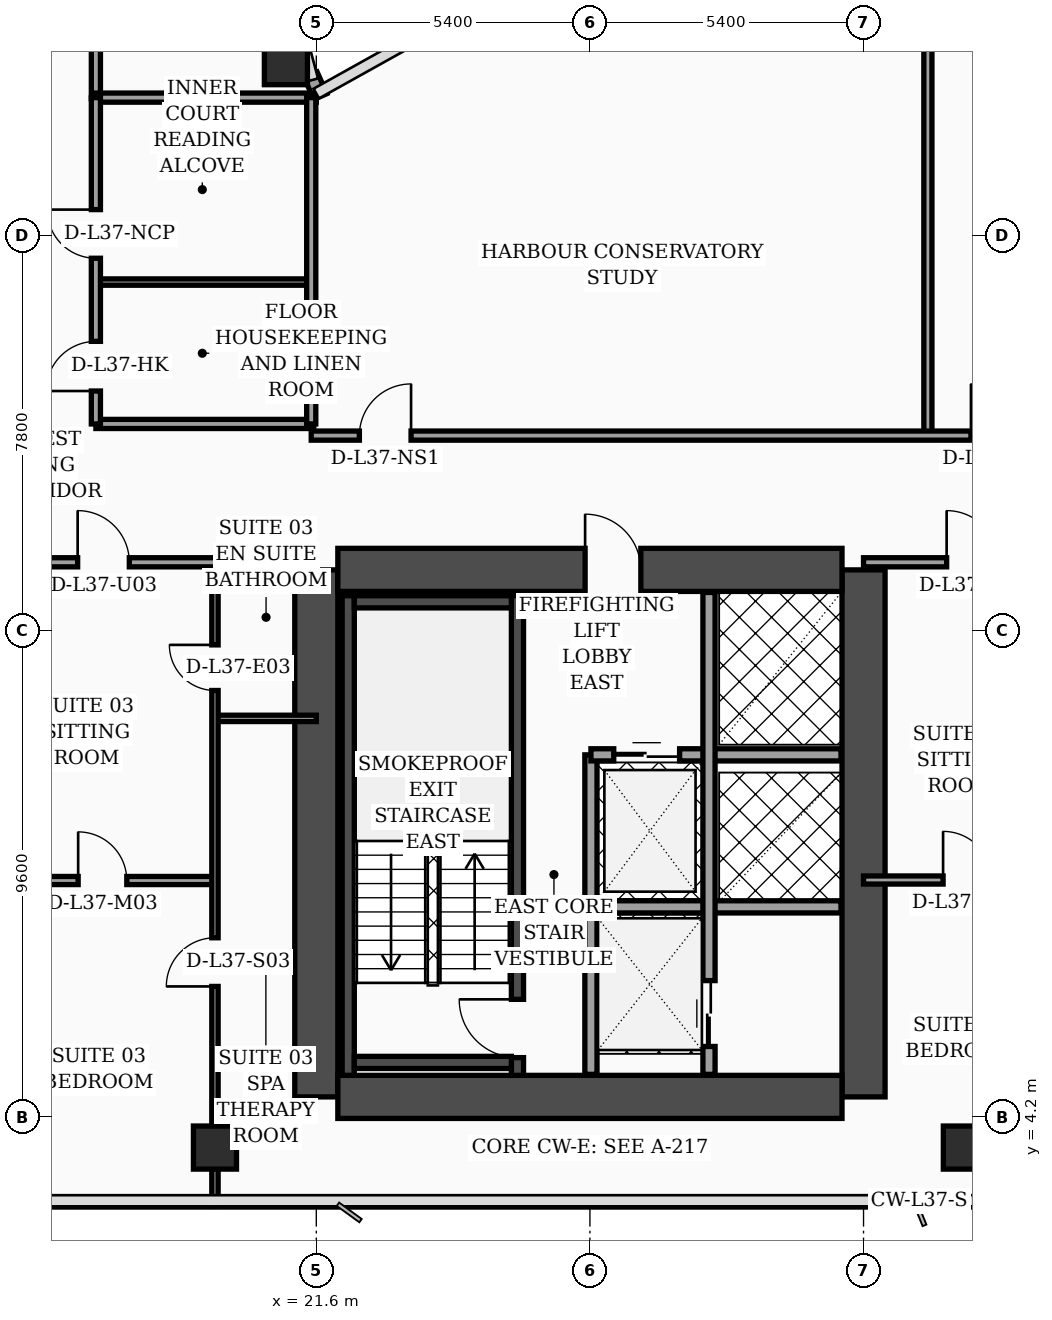
"""IFC4 building model, lengths in metres.
Left out: names, types, materials, properties, quantities, classifications, styles, units other than length and angle.
Written with IfcOpenShell. Run it as: python <this file> out.ifc"""

import sys

from ifc_helpers import new_model, si_unit, direction, frame, frame_2d, origin, origin_2d, place, context, subcontext, project, spatial, rectangle, hollow_rectangle, extrude, element, fill, save


model = new_model("IFC4")
c1 = context("Model", 3, precision=1e-05, world=origin(), true_north=direction((0.0, 1.0)))
c2 = subcontext(c1, "Body", "Model", "MODEL_VIEW")
j1 = project(units=[si_unit("LENGTHUNIT", "METRE"), si_unit("PLANEANGLEUNIT", "RADIAN")], contexts=[c1])
p1 = place(None, origin())
s1 = spatial("IfcSite", under=j1, at=p1, CompositionType="ELEMENT")
p2 = place(p1, origin())
s2 = spatial("IfcBuilding", under=s1, at=p2, CompositionType="ELEMENT")
p3 = place(p2, frame((0.0, 0.0, 152.3)))
s3 = spatial("IfcBuildingStorey", under=s2, at=p3, CompositionType="ELEMENT", Elevation=152.3)
for number, where, z_axis, x_axis in (
    (1, (21.6, 4.6, 0.0), (0.0, 0.0, 1.0), (0.0, 1.0, 0.0)),
    (2, (32.4, 4.6, 0.0), (0.0, 0.0, 1.0), (0.0, 1.0, 0.0)),
):
    element("IfcWall", number, at=place(p3, frame(where, z_axis=z_axis, x_axis=x_axis)), inside=s3, PredefinedType="SHEAR", context=c2, shape_type="SweptSolid", body=[
        extrude(rectangle(XDim=10.4, YDim=0.85, at=frame_2d((5.2, 0.0))), origin(), (0.0, 0.0, 1.0), 3.56),
    ])
p4 = place(p3, frame((22.025, 15.0, 0.0), z_axis=(0.0, 0.0, 1.0), x_axis=(1.0, 0.0, 0.0)))
e3 = element("IfcWall", 3, at=p4, inside=s3, PredefinedType="SHEAR", context=c2, shape_type="SweptSolid", body=[
    extrude(rectangle(XDim=9.95, YDim=0.85, at=frame_2d((4.975, 0.0))), origin(), (0.0, 0.0, 1.0), 3.56),
])
p5 = place(p4, frame((4.88, 0.0, 0.0)))
e4 = element("IfcOpeningElement", 4, at=p5, cuts=e3, PredefinedType="OPENING", context=c2, shape_type="SweptSolid", body=[
    extrude(rectangle(XDim=1.1, YDim=2.2, at=frame_2d((0.55, 1.1))), frame((0.0, 0.435, 0.0), z_axis=(0.0, -1.0, 0.0), x_axis=(1.0, 0.0, 0.0)), (0.0, 0.0, 1.0), 0.87),
])
p6 = place(p3, frame((22.025, 4.6, 0.0), z_axis=(0.0, 0.0, 1.0), x_axis=(1.0, 0.0, 0.0)))
e5 = element("IfcWall", 5, at=p6, inside=s3, PredefinedType="SHEAR", context=c2, shape_type="SweptSolid", body=[
    extrude(rectangle(XDim=9.95, YDim=0.85, at=frame_2d((4.975, 0.0))), origin(), (0.0, 0.0, 1.0), 3.56),
])
p7 = place(p3, frame((22.23, 5.025, 0.0), z_axis=(0.0, 0.0, 1.0), x_axis=(0.0, 1.0, 0.0)))
e6 = element("IfcWall", 6, at=p7, inside=s3, PredefinedType="SOLIDWALL", context=c2, shape_type="SweptSolid", body=[
    extrude(rectangle(XDim=9.465, YDim=0.24, at=frame_2d((4.732, 0.0))), origin(), (0.0, 0.0, 1.0), 3.56),
])
p8 = place(p3, frame((25.57, 5.025, 0.0), z_axis=(0.0, 0.0, 1.0), x_axis=(0.0, 1.0, 0.0)))
e7 = element("IfcWall", 7, at=p8, inside=s3, PredefinedType="SOLIDWALL", context=c2, shape_type="SweptSolid", body=[
    extrude(rectangle(XDim=9.465, YDim=0.24, at=frame_2d((4.732, 0.0))), origin(), (0.0, 0.0, 1.0), 3.56),
])
p9 = place(p8, frame((0.35, 0.0, 0.0)))
e8 = element("IfcOpeningElement", 8, at=p9, cuts=e7, PredefinedType="OPENING", context=c2, shape_type="SweptSolid", body=[
    extrude(rectangle(XDim=1.15, YDim=2.2, at=frame_2d((0.575, 1.1))), frame((0.0, 0.13, 0.0), z_axis=(0.0, -1.0, 0.0), x_axis=(1.0, 0.0, 0.0)), (0.0, 0.0, 1.0), 0.26),
])
for number, where, z_axis, x_axis in (
    (9, (22.35, 5.28, 0.0), (0.0, 0.0, 1.0), (1.0, 0.0, 0.0)),
    (10, (22.35, 14.37, 0.0), (0.0, 0.0, 1.0), (1.0, 0.0, 0.0)),
):
    element("IfcWall", number, at=place(p3, frame(where, z_axis=z_axis, x_axis=x_axis)), inside=s3, PredefinedType="SOLIDWALL", context=c2, shape_type="SweptSolid", body=[
        extrude(rectangle(XDim=3.1, YDim=0.24, at=frame_2d((1.55, 0.0))), origin(), (0.0, 0.0, 1.0), 3.56),
    ])
for number, where, z_axis, x_axis in (
    (11, (21.0, 25.0, 0.0), (0.0, 0.0, 1.0), (1.0, 0.0, 0.0)),
    (12, (19.6, 3.6, 0.0), (0.0, 0.0, 1.0), (1.0, 0.0, 0.0)),
    (13, (34.4, 3.6, 0.0), (0.0, 0.0, 1.0), (1.0, 0.0, 0.0)),
):
    element("IfcColumn", number, at=place(p3, frame(where, z_axis=z_axis, x_axis=x_axis)), inside=s3, PredefinedType="COLUMN", context=c2, shape_type="SweptSolid", body=[
        extrude(hollow_rectangle(XDim=0.85, YDim=0.85, WallThickness=0.036, at=origin_2d()), origin(), (0.0, 0.0, 1.0), 3.56),
    ])
p10 = place(p3, frame((21.68, 24.34, 0.0), z_axis=(0.0, 0.0, 1.0), x_axis=(-0.40758134973, 0.913168901875, 0.0)))
e14 = element("IfcWall", 14, at=p10, inside=s3, PredefinedType="SOLIDWALL", context=c2, shape_type="SweptSolid", body=[
    extrude(rectangle(XDim=0.471, YDim=0.28, at=frame_2d((0.235, 0.0))), origin(), (0.0, 0.0, 1.0), 3.56),
])
p11 = place(p3, frame((27.02, 5.045, 0.0), z_axis=(0.0, 0.0, 1.0), x_axis=(0.0, 1.0, 0.0)))
e15 = element("IfcWall", 15, at=p11, inside=s3, PredefinedType="SOLIDWALL", context=c2, shape_type="SweptSolid", body=[
    extrude(rectangle(XDim=6.305, YDim=0.24, at=frame_2d((3.153, 0.0))), origin(), (0.0, 0.0, 1.0), 3.56),
])
p12 = place(p3, frame((27.02, 11.35, 0.0), z_axis=(0.0, 0.0, 1.0), x_axis=(1.0, 0.0, 0.0)))
e16 = element("IfcWall", 16, at=p12, inside=s3, PredefinedType="SOLIDWALL", context=c2, shape_type="SweptSolid", body=[
    extrude(rectangle(XDim=4.935, YDim=0.24, at=frame_2d((2.468, 0.0))), origin(), (0.0, 0.0, 1.0), 3.56),
])
p13 = place(p12, frame((0.45, 0.0, 0.0)))
e17 = element("IfcOpeningElement", 17, at=p13, cuts=e16, PredefinedType="OPENING", context=c2, shape_type="SweptSolid", body=[
    extrude(rectangle(XDim=1.3, YDim=2.35, at=frame_2d((0.65, 1.175))), frame((0.0, 0.13, 0.0), z_axis=(0.0, -1.0, 0.0), x_axis=(1.0, 0.0, 0.0)), (0.0, 0.0, 1.0), 0.26),
])
p14 = place(p3, frame((27.02, 8.35, 0.0), z_axis=(0.0, 0.0, 1.0), x_axis=(1.0, 0.0, 0.0)))
e18 = element("IfcWall", 18, at=p14, inside=s3, PredefinedType="SOLIDWALL", context=c2, shape_type="SweptSolid", body=[
    extrude(rectangle(XDim=4.935, YDim=0.24, at=frame_2d((2.468, 0.0))), origin(), (0.0, 0.0, 1.0), 3.56),
])
p15 = place(p3, frame((29.35, 5.045, 0.0), z_axis=(0.0, 0.0, 1.0), x_axis=(0.0, 1.0, 0.0)))
e19 = element("IfcWall", 19, at=p15, inside=s3, PredefinedType="SOLIDWALL", context=c2, shape_type="SweptSolid", body=[
    extrude(rectangle(XDim=9.51, YDim=0.24, at=frame_2d((4.755, 0.0))), origin(), (0.0, 0.0, 1.0), 3.56),
])
p16 = place(p15, frame((0.55, 0.0, 0.0)))
e20 = element("IfcOpeningElement", 20, at=p16, cuts=e19, PredefinedType="OPENING", context=c2, shape_type="SweptSolid", body=[
    extrude(rectangle(XDim=1.3, YDim=2.35, at=frame_2d((0.65, 1.175))), frame((0.0, 0.13, 0.0), z_axis=(0.0, -1.0, 0.0), x_axis=(1.0, 0.0, 0.0)), (0.0, 0.0, 1.0), 0.26),
])
p17 = place(p3, frame((19.6, 12.07, 0.0), z_axis=(0.0, 0.0, 1.0), x_axis=(1.0, 0.0, 0.0)))
e21 = element("IfcWall", 21, at=p17, inside=s3, PredefinedType="PARTITIONING", context=c2, shape_type="SweptSolid", body=[
    extrude(rectangle(XDim=2.0, YDim=0.125, at=frame_2d((1.0, 0.0))), origin(), (0.0, 0.0, 1.0), 3.56),
])
p18 = place(p3, frame((15.15, 8.87, 0.0), z_axis=(0.0, 0.0, 1.0), x_axis=(1.0, 0.0, 0.0)))
e22 = element("IfcWall", 22, at=p18, inside=s3, PredefinedType="PARTITIONING", context=c2, shape_type="SweptSolid", body=[
    extrude(rectangle(XDim=4.45, YDim=0.16, at=frame_2d((2.225, 0.0))), origin(), (0.0, 0.0, 1.0), 3.56),
])
p19 = place(p18, frame((1.75, 0.0, 0.0)))
e23 = element("IfcOpeningElement", 23, at=p19, cuts=e22, PredefinedType="OPENING", context=c2, shape_type="SweptSolid", body=[
    extrude(rectangle(XDim=0.96, YDim=2.2, at=frame_2d((0.48, 1.1))), frame((0.0, 0.09, 0.0), z_axis=(0.0, -1.0, 0.0), x_axis=(1.0, 0.0, 0.0)), (0.0, 0.0, 1.0), 0.18),
])
p20 = place(p3, frame((19.6, 2.44, 0.0), z_axis=(0.0, 0.0, 1.0), x_axis=(0.0, 1.0, 0.0)))
e24 = element("IfcWall", 24, at=p20, inside=s3, PredefinedType="PARTITIONING", context=c2, shape_type="SweptSolid", body=[
    extrude(rectangle(XDim=12.71, YDim=0.125, at=frame_2d((6.355, 0.0))), origin(), (0.0, 0.0, 1.0), 2.49),
])
p21 = place(p20, frame((4.34, 0.0, 0.0)))
e25 = element("IfcOpeningElement", 25, at=p21, cuts=e24, PredefinedType="OPENING", context=c2, shape_type="SweptSolid", body=[
    extrude(rectangle(XDim=0.96, YDim=2.2, at=frame_2d((0.48, 1.1))), frame((0.0, 0.073, 0.0), z_axis=(0.0, -1.0, 0.0), x_axis=(1.0, 0.0, 0.0)), (0.0, 0.0, 1.0), 0.145),
])
p22 = place(p20, frame((10.18, 0.0, 0.0)))
e26 = element("IfcOpeningElement", 26, at=p22, cuts=e24, PredefinedType="OPENING", context=c2, shape_type="SweptSolid", body=[
    extrude(rectangle(XDim=0.9, YDim=2.15, at=frame_2d((0.45, 1.075))), frame((0.0, 0.073, 0.0), z_axis=(0.0, -1.0, 0.0), x_axis=(1.0, 0.0, 0.0)), (0.0, 0.0, 1.0), 0.145),
])
p23 = place(p3, frame((15.15, 15.15, 0.0), z_axis=(0.0, 0.0, 1.0), x_axis=(1.0, 0.0, 0.0)))
e27 = element("IfcWall", 27, at=p23, inside=s3, PredefinedType="PARTITIONING", context=c2, shape_type="SweptSolid", body=[
    extrude(rectangle(XDim=6.45, YDim=0.18, at=frame_2d((3.225, 0.0))), origin(), (0.0, 0.0, 1.0), 2.49),
])
p24 = place(p23, frame((1.74, 0.0, 0.0)))
e28 = element("IfcOpeningElement", 28, at=p24, cuts=e27, PredefinedType="OPENING", context=c2, shape_type="SweptSolid", body=[
    extrude(rectangle(XDim=1.02, YDim=2.2, at=frame_2d((0.51, 1.1))), frame((0.0, 0.1, 0.0), z_axis=(0.0, -1.0, 0.0), x_axis=(1.0, 0.0, 0.0)), (0.0, 0.0, 1.0), 0.2),
])
p25 = place(p3, frame((17.25, 24.3, 0.0), z_axis=(0.0, 0.0, 1.0), x_axis=(0.0, 1.0, 0.0)))
e29 = element("IfcWall", 29, at=p25, inside=s3, PredefinedType="PARTITIONING", context=c2, shape_type="SweptSolid", body=[
    extrude(rectangle(XDim=17.65, YDim=0.18, at=frame_2d((8.825, 0.0))), origin(), (0.0, 0.0, 1.0), 2.94),
])
p26 = place(p3, frame((17.25, 17.88, 0.0), z_axis=(0.0, 0.0, 1.0), x_axis=(1.0, 0.0, 0.0)))
e30 = element("IfcWall", 30, at=p26, inside=s3, PredefinedType="PARTITIONING", context=c2, shape_type="SweptSolid", body=[
    extrude(rectangle(XDim=4.3, YDim=0.18, at=frame_2d((2.15, 0.0))), origin(), (0.0, 0.0, 1.0), 3.09),
])
p27 = place(p3, frame((17.25, 20.68, 0.0), z_axis=(0.0, 0.0, 1.0), x_axis=(1.0, 0.0, 0.0)))
e31 = element("IfcWall", 31, at=p27, inside=s3, PredefinedType="PARTITIONING", context=c2, shape_type="SweptSolid", body=[
    extrude(rectangle(XDim=4.3, YDim=0.125, at=frame_2d((2.15, 0.0))), origin(), (0.0, 0.0, 1.0), 3.56),
])
p28 = place(p3, frame((17.25, 24.32, 0.0), z_axis=(0.0, 0.0, 1.0), x_axis=(1.0, 0.0, 0.0)))
e32 = element("IfcWall", 32, at=p28, inside=s3, PredefinedType="PARTITIONING", context=c2, shape_type="SweptSolid", body=[
    extrude(rectangle(XDim=4.35, YDim=0.18, at=frame_2d((2.175, 0.0))), origin(), (0.0, 0.0, 1.0), 3.56),
])
p29 = place(p3, frame((21.5, 17.88, 0.0), z_axis=(0.0, 0.0, 1.0), x_axis=(0.0, 1.0, 0.0)))
e33 = element("IfcWall", 33, at=p29, inside=s3, PredefinedType="PARTITIONING", context=c2, shape_type="SweptSolid", body=[
    extrude(rectangle(XDim=6.44, YDim=0.18, at=frame_2d((3.22, 0.0))), origin(), (0.0, 0.0, 1.0), 3.09),
])
p30 = place(p3, frame((17.25, 17.88, 0.0), z_axis=(0.0, 0.0, 1.0), x_axis=(0.0, 1.0, 0.0)))
e34 = element("IfcWall", 34, at=p30, inside=s3, PredefinedType="PARTITIONING", context=c2, shape_type="SweptSolid", body=[
    extrude(rectangle(XDim=6.44, YDim=0.18, at=frame_2d((3.22, 0.0))), origin(), (0.0, 0.0, 1.0), 3.09),
])
p31 = place(p30, frame((0.65, 0.0, 0.0)))
e35 = element("IfcOpeningElement", 35, at=p31, cuts=e34, PredefinedType="OPENING", context=c2, shape_type="SweptSolid", body=[
    extrude(rectangle(XDim=0.98, YDim=2.15, at=frame_2d((0.49, 1.075))), frame((0.0, 0.1, 0.0), z_axis=(0.0, -1.0, 0.0), x_axis=(1.0, 0.0, 0.0)), (0.0, 0.0, 1.0), 0.2),
])
p32 = place(p30, frame((3.27, 0.0, 0.0)))
e36 = element("IfcOpeningElement", 36, at=p32, cuts=e34, PredefinedType="OPENING", context=c2, shape_type="SweptSolid", body=[
    extrude(rectangle(XDim=0.96, YDim=2.2, at=frame_2d((0.48, 1.1))), frame((0.0, 0.1, 0.0), z_axis=(0.0, -1.0, 0.0), x_axis=(1.0, 0.0, 0.0)), (0.0, 0.0, 1.0), 0.2),
])
p33 = place(p3, frame((32.4, 8.88, 0.0), z_axis=(0.0, 0.0, 1.0), x_axis=(1.0, 0.0, 0.0)))
e37 = element("IfcWall", 37, at=p33, inside=s3, PredefinedType="PARTITIONING", context=c2, shape_type="SweptSolid", body=[
    extrude(rectangle(XDim=4.09, YDim=0.16, at=frame_2d((2.045, 0.0))), origin(), (0.0, 0.0, 1.0), 2.94),
])
p34 = place(p33, frame((1.57, 0.0, 0.0)))
e38 = element("IfcOpeningElement", 38, at=p34, cuts=e37, PredefinedType="OPENING", context=c2, shape_type="SweptSolid", body=[
    extrude(rectangle(XDim=0.96, YDim=2.2, at=frame_2d((0.48, 1.1))), frame((0.0, 0.09, 0.0), z_axis=(0.0, -1.0, 0.0), x_axis=(1.0, 0.0, 0.0)), (0.0, 0.0, 1.0), 0.18),
])
p35 = place(p3, frame((32.4, 15.15, 0.0), z_axis=(0.0, 0.0, 1.0), x_axis=(1.0, 0.0, 0.0)))
e39 = element("IfcWall", 39, at=p35, inside=s3, PredefinedType="PARTITIONING", context=c2, shape_type="SweptSolid", body=[
    extrude(rectangle(XDim=20.2, YDim=0.18, at=frame_2d((10.1, 0.0))), origin(), (0.0, 0.0, 1.0), 2.94),
])
p36 = place(p35, frame((1.64, 0.0, 0.0)))
e40 = element("IfcOpeningElement", 40, at=p36, cuts=e39, PredefinedType="OPENING", context=c2, shape_type="SweptSolid", body=[
    extrude(rectangle(XDim=1.02, YDim=2.2, at=frame_2d((0.51, 1.1))), frame((0.0, 0.1, 0.0), z_axis=(0.0, -1.0, 0.0), x_axis=(1.0, 0.0, 0.0)), (0.0, 0.0, 1.0), 0.2),
])
p37 = place(p35, frame((8.2, 0.0, 0.0)))
e41 = element("IfcOpeningElement", 41, at=p37, cuts=e39, PredefinedType="OPENING", context=c2, shape_type="SweptSolid", body=[
    extrude(rectangle(XDim=1.02, YDim=2.2, at=frame_2d((0.51, 1.1))), frame((0.0, 0.1, 0.0), z_axis=(0.0, -1.0, 0.0), x_axis=(1.0, 0.0, 0.0)), (0.0, 0.0, 1.0), 0.2),
])
p38 = place(p35, frame((15.39, 0.0, 0.0)))
e42 = element("IfcOpeningElement", 42, at=p38, cuts=e39, PredefinedType="OPENING", context=c2, shape_type="SweptSolid", body=[
    extrude(rectangle(XDim=1.02, YDim=2.2, at=frame_2d((0.51, 1.1))), frame((0.0, 0.1, 0.0), z_axis=(0.0, -1.0, 0.0), x_axis=(1.0, 0.0, 0.0)), (0.0, 0.0, 1.0), 0.2),
])
p39 = place(p3, frame((33.67, 17.65, 0.0), z_axis=(0.0, 0.0, 1.0), x_axis=(0.0, 1.0, 0.0)))
e43 = element("IfcWall", 43, at=p39, inside=s3, PredefinedType="PARTITIONING", context=c2, shape_type="SweptSolid", body=[
    extrude(rectangle(XDim=13.56, YDim=0.16, at=frame_2d((6.78, 0.0))), origin(), (0.0, 0.0, 1.0), 2.94),
])
p40 = place(p3, frame((21.5, 17.65, 0.0), z_axis=(0.0, 0.0, 1.0), x_axis=(1.0, 0.0, 0.0)))
e44 = element("IfcWall", 44, at=p40, inside=s3, PredefinedType="PARTITIONING", context=c2, shape_type="SweptSolid", body=[
    extrude(rectangle(XDim=24.25, YDim=0.18, at=frame_2d((12.125, 0.0))), origin(), (0.0, 0.0, 1.0), 2.94),
])
p41 = place(p40, frame((0.95, 0.0, 0.0)))
e45 = element("IfcOpeningElement", 45, at=p41, cuts=e44, PredefinedType="OPENING", context=c2, shape_type="SweptSolid", body=[
    extrude(rectangle(XDim=1.02, YDim=2.2, at=frame_2d((0.51, 1.1))), frame((0.0, 0.1, 0.0), z_axis=(0.0, -1.0, 0.0), x_axis=(1.0, 0.0, 0.0)), (0.0, 0.0, 1.0), 0.2),
])
p42 = place(p40, frame((13.02, 0.0, 0.0)))
e46 = element("IfcOpeningElement", 46, at=p42, cuts=e44, PredefinedType="OPENING", context=c2, shape_type="SweptSolid", body=[
    extrude(rectangle(XDim=1.02, YDim=2.2, at=frame_2d((0.51, 1.1))), frame((0.0, 0.1, 0.0), z_axis=(0.0, -1.0, 0.0), x_axis=(1.0, 0.0, 0.0)), (0.0, 0.0, 1.0), 0.2),
])
p43 = place(p13, origin())
e47 = element("IfcDoor", 47, at=p43, inside=s3, OperationType="DOUBLE_DOOR_SLIDING", PredefinedType="DOOR", context=c2, shape_type="SweptSolid", body=[
    extrude(rectangle(XDim=1.3, YDim=2.35, at=frame_2d((0.65, 1.175))), frame((0.0, 0.025, 0.0), z_axis=(0.0, -1.0, 0.0), x_axis=(1.0, 0.0, 0.0)), (0.0, 0.0, 1.0), 0.05),
])
fill(e17, e47)
p44 = place(p16, origin())
e48 = element("IfcDoor", 48, at=p44, inside=s3, OperationType="DOUBLE_DOOR_SLIDING", PredefinedType="DOOR", context=c2, shape_type="SweptSolid", body=[
    extrude(rectangle(XDim=1.3, YDim=2.35, at=frame_2d((0.65, 1.175))), frame((0.0, 0.025, 0.0), z_axis=(0.0, -1.0, 0.0), x_axis=(1.0, 0.0, 0.0)), (0.0, 0.0, 1.0), 0.05),
])
fill(e20, e48)
p45 = place(p19, origin())
e49 = element("IfcDoor", 49, at=p45, inside=s3, OperationType="SINGLE_SWING_LEFT", PredefinedType="DOOR", context=c2, shape_type="SweptSolid", body=[
    extrude(rectangle(XDim=0.96, YDim=2.2, at=frame_2d((0.48, 1.1))), frame((0.0, 0.025, 0.0), z_axis=(0.0, -1.0, 0.0), x_axis=(1.0, 0.0, 0.0)), (0.0, 0.0, 1.0), 0.05),
])
fill(e23, e49)
p46 = place(p21, origin())
e50 = element("IfcDoor", 50, at=p46, inside=s3, OperationType="SINGLE_SWING_LEFT", PredefinedType="DOOR", context=c2, shape_type="SweptSolid", body=[
    extrude(rectangle(XDim=0.96, YDim=2.2, at=frame_2d((0.48, 1.1))), frame((0.0, 0.025, 0.0), z_axis=(0.0, -1.0, 0.0), x_axis=(1.0, 0.0, 0.0)), (0.0, 0.0, 1.0), 0.05),
])
fill(e25, e50)
p47 = place(p22, origin())
e51 = element("IfcDoor", 51, at=p47, inside=s3, OperationType="SINGLE_SWING_RIGHT", PredefinedType="DOOR", context=c2, shape_type="SweptSolid", body=[
    extrude(rectangle(XDim=0.9, YDim=2.15, at=frame_2d((0.45, 1.075))), frame((0.0, 0.025, 0.0), z_axis=(0.0, -1.0, 0.0), x_axis=(1.0, 0.0, 0.0)), (0.0, 0.0, 1.0), 0.05),
])
fill(e26, e51)
p48 = place(p24, origin())
e52 = element("IfcDoor", 52, at=p48, inside=s3, OperationType="SINGLE_SWING_LEFT", PredefinedType="DOOR", context=c2, shape_type="SweptSolid", body=[
    extrude(rectangle(XDim=1.02, YDim=2.2, at=frame_2d((0.51, 1.1))), frame((0.0, 0.025, 0.0), z_axis=(0.0, -1.0, 0.0), x_axis=(1.0, 0.0, 0.0)), (0.0, 0.0, 1.0), 0.05),
])
fill(e28, e52)
p49 = place(p31, origin())
e53 = element("IfcDoor", 53, at=p49, inside=s3, OperationType="SINGLE_SWING_LEFT", PredefinedType="DOOR", context=c2, shape_type="SweptSolid", body=[
    extrude(rectangle(XDim=0.98, YDim=2.15, at=frame_2d((0.49, 1.075))), frame((0.0, 0.025, 0.0), z_axis=(0.0, -1.0, 0.0), x_axis=(1.0, 0.0, 0.0)), (0.0, 0.0, 1.0), 0.05),
])
fill(e35, e53)
p50 = place(p32, origin())
e54 = element("IfcDoor", 54, at=p50, inside=s3, OperationType="SINGLE_SWING_RIGHT", PredefinedType="DOOR", context=c2, shape_type="SweptSolid", body=[
    extrude(rectangle(XDim=0.96, YDim=2.2, at=frame_2d((0.48, 1.1))), frame((0.0, 0.025, 0.0), z_axis=(0.0, -1.0, 0.0), x_axis=(1.0, 0.0, 0.0)), (0.0, 0.0, 1.0), 0.05),
])
fill(e36, e54)
p51 = place(p34, origin())
e55 = element("IfcDoor", 55, at=p51, inside=s3, OperationType="SINGLE_SWING_LEFT", PredefinedType="DOOR", context=c2, shape_type="SweptSolid", body=[
    extrude(rectangle(XDim=0.96, YDim=2.2, at=frame_2d((0.48, 1.1))), frame((0.0, 0.025, 0.0), z_axis=(0.0, -1.0, 0.0), x_axis=(1.0, 0.0, 0.0)), (0.0, 0.0, 1.0), 0.05),
])
fill(e38, e55)
p52 = place(p36, origin())
e56 = element("IfcDoor", 56, at=p52, inside=s3, OperationType="SINGLE_SWING_LEFT", PredefinedType="DOOR", context=c2, shape_type="SweptSolid", body=[
    extrude(rectangle(XDim=1.02, YDim=2.2, at=frame_2d((0.51, 1.1))), frame((0.0, 0.025, 0.0), z_axis=(0.0, -1.0, 0.0), x_axis=(1.0, 0.0, 0.0)), (0.0, 0.0, 1.0), 0.05),
])
fill(e40, e56)
p53 = place(p41, origin())
e57 = element("IfcDoor", 57, at=p53, inside=s3, OperationType="SINGLE_SWING_RIGHT", PredefinedType="DOOR", context=c2, shape_type="SweptSolid", body=[
    extrude(rectangle(XDim=1.02, YDim=2.2, at=frame_2d((0.51, 1.1))), frame((0.0, 0.025, 0.0), z_axis=(0.0, -1.0, 0.0), x_axis=(1.0, 0.0, 0.0)), (0.0, 0.0, 1.0), 0.05),
])
fill(e45, e57)
p54 = place(p42, origin())
e58 = element("IfcDoor", 58, at=p54, inside=s3, OperationType="SINGLE_SWING_LEFT", PredefinedType="DOOR", context=c2, shape_type="SweptSolid", body=[
    extrude(rectangle(XDim=1.02, YDim=2.2, at=frame_2d((0.51, 1.1))), frame((0.0, 0.025, 0.0), z_axis=(0.0, -1.0, 0.0), x_axis=(1.0, 0.0, 0.0)), (0.0, 0.0, 1.0), 0.05),
])
fill(e46, e58)
p55 = place(p9, origin())
e59 = element("IfcDoor", 59, at=p55, inside=s3, OperationType="SINGLE_SWING_RIGHT", PredefinedType="DOOR", context=c2, shape_type="SweptSolid", body=[
    extrude(rectangle(XDim=1.15, YDim=2.2, at=frame_2d((0.575, 1.1))), frame((0.0, 0.025, 0.0), z_axis=(0.0, -1.0, 0.0), x_axis=(1.0, 0.0, 0.0)), (0.0, 0.0, 1.0), 0.05),
])
fill(e8, e59)
p56 = place(p5, origin())
e60 = element("IfcDoor", 60, at=p56, inside=s3, OperationType="SINGLE_SWING_LEFT", PredefinedType="DOOR", context=c2, shape_type="SweptSolid", body=[
    extrude(rectangle(XDim=1.1, YDim=2.2, at=frame_2d((0.55, 1.1))), frame((0.0, 0.025, 0.0), z_axis=(0.0, -1.0, 0.0), x_axis=(1.0, 0.0, 0.0)), (0.0, 0.0, 1.0), 0.05),
])
fill(e4, e60)
save(model, sys.argv[1])
